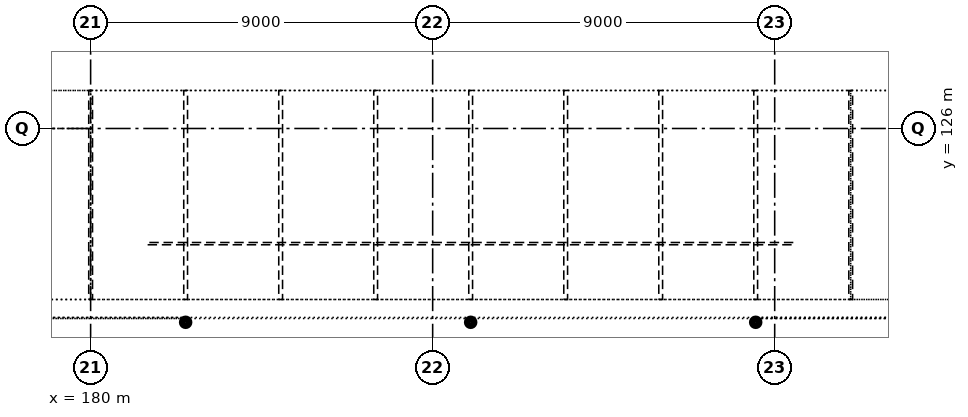
"""IFC4 building model, lengths in metres.
Left out: names, types, materials, properties, quantities, classifications, styles, units other than length and angle.
Written with IfcOpenShell. Run it as: python <this file> out.ifc"""

import sys

from ifc_helpers import new_model, si_unit, direction, frame, origin, origin_2d, place, context, subcontext, project, spatial, hollow_circle, extrude, element, save


model = new_model("IFC4")
c1 = context("Model", 3, precision=1e-05, world=origin(), true_north=direction((0.0, 1.0)))
c2 = subcontext(c1, "Body", "Model", "MODEL_VIEW")
j1 = project(units=[si_unit("LENGTHUNIT", "METRE"), si_unit("PLANEANGLEUNIT", "RADIAN")], contexts=[c1])
p1 = place(None, origin())
s1 = spatial("IfcSite", under=j1, at=p1, CompositionType="ELEMENT")
p2 = place(p1, origin())
s2 = spatial("IfcBuilding", under=s1, at=p2, CompositionType="ELEMENT")
p3 = place(p2, origin())
s3 = spatial("IfcBuildingStorey", under=s2, at=p3, CompositionType="ELEMENT", Elevation=0.0)
for number, where, z_axis, x_axis in (
    (1, (182.5, 120.9, -2.1), (0.0, 0.0, 1.0), (1.0, 0.0, 0.0)),
    (2, (190.0, 120.9, -2.1), (0.0, 0.0, 1.0), (1.0, 0.0, 0.0)),
    (3, (197.5, 120.9, -2.1), (0.0, 0.0, 1.0), (1.0, 0.0, 0.0)),
):
    element("IfcColumn", number, at=place(p3, frame(where, z_axis=z_axis, x_axis=x_axis)), inside=s3, PredefinedType="COLUMN", context=c2, shape_type="SweptSolid", body=[
        extrude(hollow_circle(Radius=0.097, WallThickness=0.008, at=origin_2d()), origin(), (0.0, 0.0, 1.0), 6.776),
    ])
save(model, sys.argv[1])
